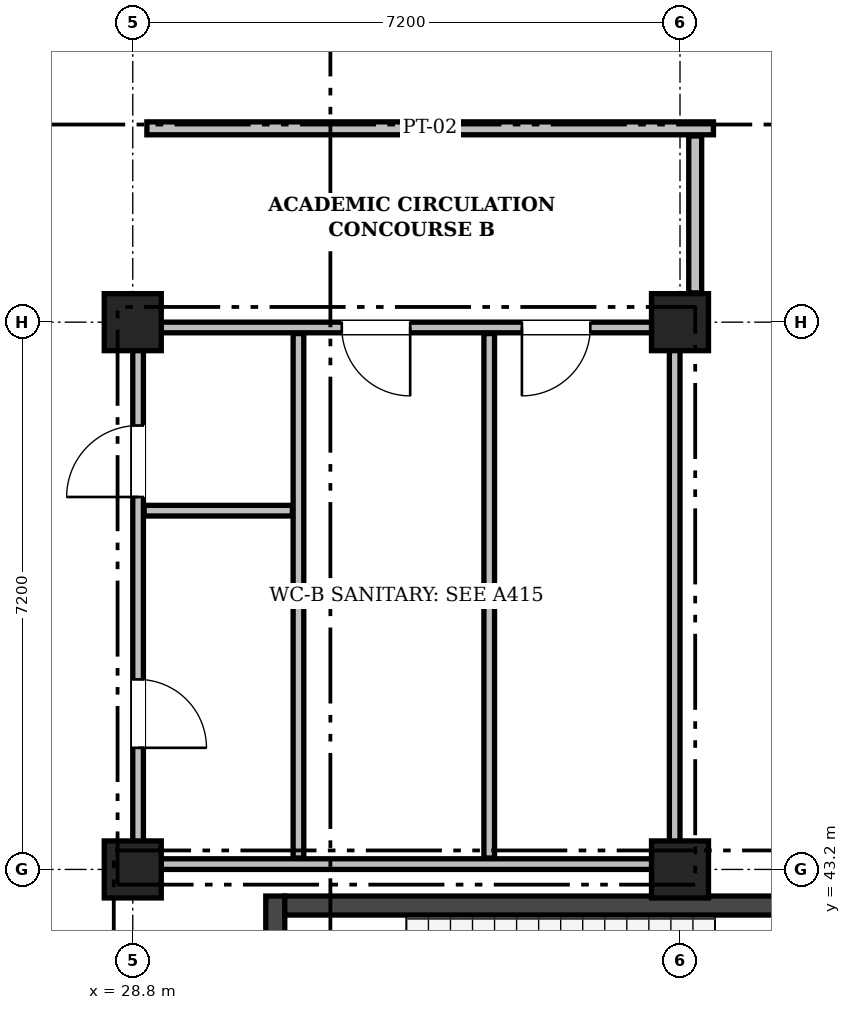
"""IFC4 building model, lengths in metres.
Left out: names, types, materials, properties, quantities, classifications, styles, units other than length and angle.
Written with IfcOpenShell. Run it as: python <this file> out.ifc"""

import sys

from ifc_helpers import new_model, si_unit, direction, frame, frame_2d, origin, origin_2d, place, context, subcontext, project, spatial, rectangle, extrude, element, fill, save


model = new_model("IFC4")
c1 = context("Model", 3, precision=1e-05, world=origin(), true_north=direction((0.0, 1.0)))
c2 = subcontext(c1, "Body", "Model", "MODEL_VIEW")
j1 = project(units=[si_unit("LENGTHUNIT", "METRE"), si_unit("PLANEANGLEUNIT", "RADIAN")], contexts=[c1])
p1 = place(None, origin())
s1 = spatial("IfcSite", under=j1, at=p1, CompositionType="ELEMENT")
p2 = place(p1, origin())
s2 = spatial("IfcBuilding", under=s1, at=p2, CompositionType="ELEMENT")
p3 = place(p2, frame((0.0, 0.0, 14.4)))
s3 = spatial("IfcBuildingStorey", under=s2, at=p3, CompositionType="ELEMENT", Elevation=14.4)
for number, where, z_axis, x_axis in (
    (1, (28.8, 43.2, 0.0), (0.0, 0.0, 1.0), (1.0, 0.0, 0.0)),
    (2, (28.8, 50.4, 0.0), (0.0, 0.0, 1.0), (1.0, 0.0, 0.0)),
    (3, (36.0, 43.2, 0.0), (0.0, 0.0, 1.0), (1.0, 0.0, 0.0)),
    (4, (36.0, 50.4, 0.0), (0.0, 0.0, 1.0), (1.0, 0.0, 0.0)),
):
    element("IfcColumn", number, at=place(p3, frame(where, z_axis=z_axis, x_axis=x_axis)), inside=s3, PredefinedType="COLUMN", context=c2, shape_type="SweptSolid", body=[
        extrude(rectangle(XDim=0.75, YDim=0.75, at=origin_2d()), origin(), (0.0, 0.0, 1.0), 4.5),
    ])
p4 = place(p3, frame((30.675, 39.15, 0.0), z_axis=(0.0, 0.0, 1.0), x_axis=(0.0, 1.0, 0.0)))
e5 = element("IfcWall", 5, at=p4, inside=s3, PredefinedType="SHEAR", context=c2, shape_type="SweptSolid", body=[
    extrude(rectangle(XDim=3.7, YDim=0.25, at=frame_2d((1.85, 0.0))), origin(), (0.0, 0.0, 1.0), 4.25),
])
p5 = place(p4, frame((1.25, 0.0, 0.0)))
e6 = element("IfcOpeningElement", 6, at=p5, cuts=e5, PredefinedType="OPENING", context=c2, shape_type="SweptSolid", body=[
    extrude(rectangle(XDim=1.2, YDim=2.15, at=frame_2d((0.6, 1.075))), frame((0.0, 0.137, 0.0), z_axis=(0.0, -1.0, 0.0), x_axis=(1.0, 0.0, 0.0)), (0.0, 0.0, 1.0), 0.274),
])
p6 = place(p3, frame((30.8, 42.725, 0.0), z_axis=(0.0, 0.0, 1.0), x_axis=(1.0, 0.0, 0.0)))
e7 = element("IfcWall", 7, at=p6, inside=s3, PredefinedType="SHEAR", context=c2, shape_type="SweptSolid", body=[
    extrude(rectangle(XDim=7.6, YDim=0.25, at=frame_2d((3.8, 0.0))), origin(), (0.0, 0.0, 1.0), 4.25),
])
p7 = place(p3, frame((28.87, 43.27, 0.0), z_axis=(0.0, 0.0, 1.0), x_axis=(1.0, 0.0, 0.0)))
e8 = element("IfcWall", 8, at=p7, inside=s3, PredefinedType="PARTITIONING", context=c2, shape_type="SweptSolid", body=[
    extrude(rectangle(XDim=7.06, YDim=0.14, at=frame_2d((3.53, 0.0))), origin(), (0.0, 0.0, 1.0), 3.7),
])
p8 = place(p3, frame((28.87, 50.33, 0.0), z_axis=(0.0, 0.0, 1.0), x_axis=(1.0, 0.0, 0.0)))
e9 = element("IfcWall", 9, at=p8, inside=s3, PredefinedType="PARTITIONING", context=c2, shape_type="SweptSolid", body=[
    extrude(rectangle(XDim=7.06, YDim=0.14, at=frame_2d((3.53, 0.0))), origin(), (0.0, 0.0, 1.0), 3.7),
])
p9 = place(p8, frame((2.68, 0.0, 0.0)))
e10 = element("IfcOpeningElement", 10, at=p9, cuts=e9, PredefinedType="OPENING", context=c2, shape_type="SweptSolid", body=[
    extrude(rectangle(XDim=0.9, YDim=2.08, at=frame_2d((0.45, 1.04))), frame((0.0, 0.082, 0.0), z_axis=(0.0, -1.0, 0.0), x_axis=(1.0, 0.0, 0.0)), (0.0, 0.0, 1.0), 0.164),
])
p10 = place(p8, frame((5.05, 0.0, 0.0)))
e11 = element("IfcOpeningElement", 11, at=p10, cuts=e9, PredefinedType="OPENING", context=c2, shape_type="SweptSolid", body=[
    extrude(rectangle(XDim=0.9, YDim=2.08, at=frame_2d((0.45, 1.04))), frame((0.0, 0.082, 0.0), z_axis=(0.0, -1.0, 0.0), x_axis=(1.0, 0.0, 0.0)), (0.0, 0.0, 1.0), 0.164),
])
p11 = place(p3, frame((28.87, 43.35, 0.0), z_axis=(0.0, 0.0, 1.0), x_axis=(0.0, 1.0, 0.0)))
e12 = element("IfcWall", 12, at=p11, inside=s3, PredefinedType="PARTITIONING", context=c2, shape_type="SweptSolid", body=[
    extrude(rectangle(XDim=6.9, YDim=0.14, at=frame_2d((3.45, 0.0))), origin(), (0.0, 0.0, 1.0), 3.73),
])
p12 = place(p11, frame((1.45, 0.0, 0.0)))
e13 = element("IfcOpeningElement", 13, at=p12, cuts=e12, PredefinedType="OPENING", context=c2, shape_type="SweptSolid", body=[
    extrude(rectangle(XDim=0.9, YDim=2.08, at=frame_2d((0.45, 1.04))), frame((0.0, 0.082, 0.0), z_axis=(0.0, -1.0, 0.0), x_axis=(1.0, 0.0, 0.0)), (0.0, 0.0, 1.0), 0.164),
])
p13 = place(p11, frame((4.75, 0.0, 0.0)))
e14 = element("IfcOpeningElement", 14, at=p13, cuts=e12, PredefinedType="OPENING", context=c2, shape_type="SweptSolid", body=[
    extrude(rectangle(XDim=0.94, YDim=2.1, at=frame_2d((0.47, 1.05))), frame((0.0, 0.082, 0.0), z_axis=(0.0, -1.0, 0.0), x_axis=(1.0, 0.0, 0.0)), (0.0, 0.0, 1.0), 0.164),
])
p14 = place(p3, frame((35.93, 43.35, 0.0), z_axis=(0.0, 0.0, 1.0), x_axis=(0.0, 1.0, 0.0)))
e15 = element("IfcWall", 15, at=p14, inside=s3, PredefinedType="PARTITIONING", context=c2, shape_type="SweptSolid", body=[
    extrude(rectangle(XDim=6.9, YDim=0.14, at=frame_2d((3.45, 0.0))), origin(), (0.0, 0.0, 1.0), 3.73),
])
for number, where, z_axis, x_axis in (
    (16, (30.98, 43.35, 0.0), (0.0, 0.0, 1.0), (0.0, 1.0, 0.0)),
    (17, (33.49, 43.35, 0.0), (0.0, 0.0, 1.0), (0.0, 1.0, 0.0)),
):
    element("IfcWall", number, at=place(p3, frame(where, z_axis=z_axis, x_axis=x_axis)), inside=s3, PredefinedType="PARTITIONING", context=c2, shape_type="SweptSolid", body=[
        extrude(rectangle(XDim=6.9, YDim=0.14, at=frame_2d((3.45, 0.0))), origin(), (0.0, 0.0, 1.0), 4.16),
    ])
p15 = place(p3, frame((28.95, 47.92, 0.0), z_axis=(0.0, 0.0, 1.0), x_axis=(1.0, 0.0, 0.0)))
e18 = element("IfcWall", 18, at=p15, inside=s3, PredefinedType="PARTITIONING", context=c2, shape_type="SweptSolid", body=[
    extrude(rectangle(XDim=1.95, YDim=0.14, at=frame_2d((0.975, 0.0))), origin(), (0.0, 0.0, 1.0), 4.16),
])
p16 = place(p3, frame((28.986, 52.95, 0.0), z_axis=(0.0, 0.0, 1.0), x_axis=(1.0, 0.0, 0.0)))
e19 = element("IfcWall", 19, at=p16, inside=s3, PredefinedType="PARTITIONING", context=c2, shape_type="SweptSolid", body=[
    extrude(rectangle(XDim=7.454, YDim=0.17, at=frame_2d((3.727, 0.0))), origin(), (0.0, 0.0, 1.0), 4.16),
])
p17 = place(p3, frame((36.2, 50.785, 0.0), z_axis=(0.0, 0.0, 1.0), x_axis=(0.0, 1.0, 0.0)))
e20 = element("IfcWall", 20, at=p17, inside=s3, PredefinedType="PARTITIONING", context=c2, shape_type="SweptSolid", body=[
    extrude(rectangle(XDim=2.065, YDim=0.17, at=frame_2d((1.033, 0.0))), origin(), (0.0, 0.0, 1.0), 3.73),
])
p18 = place(p12, frame((0.9, 0.0, 0.0), z_axis=(0.0, 0.0, 1.0), x_axis=(-1.0, 0.0, 0.0)))
e21 = element("IfcDoor", 21, at=p18, inside=s3, OperationType="SINGLE_SWING_RIGHT", PredefinedType="DOOR", context=c2, shape_type="SweptSolid", body=[
    extrude(rectangle(XDim=0.9, YDim=2.08, at=frame_2d((0.45, 1.04))), frame((0.0, 0.025, 0.0), z_axis=(0.0, -1.0, 0.0), x_axis=(1.0, 0.0, 0.0)), (0.0, 0.0, 1.0), 0.05),
])
fill(e13, e21)
p19 = place(p13, origin())
e22 = element("IfcDoor", 22, at=p19, inside=s3, OperationType="SINGLE_SWING_LEFT", PredefinedType="DOOR", context=c2, shape_type="SweptSolid", body=[
    extrude(rectangle(XDim=0.94, YDim=2.1, at=frame_2d((0.47, 1.05))), frame((0.0, 0.025, 0.0), z_axis=(0.0, -1.0, 0.0), x_axis=(1.0, 0.0, 0.0)), (0.0, 0.0, 1.0), 0.05),
])
fill(e14, e22)
p20 = place(p9, frame((0.9, 0.0, 0.0), z_axis=(0.0, 0.0, 1.0), x_axis=(-1.0, 0.0, 0.0)))
e23 = element("IfcDoor", 23, at=p20, inside=s3, OperationType="SINGLE_SWING_LEFT", PredefinedType="DOOR", context=c2, shape_type="SweptSolid", body=[
    extrude(rectangle(XDim=0.9, YDim=2.08, at=frame_2d((0.45, 1.04))), frame((0.0, 0.025, 0.0), z_axis=(0.0, -1.0, 0.0), x_axis=(1.0, 0.0, 0.0)), (0.0, 0.0, 1.0), 0.05),
])
fill(e10, e23)
p21 = place(p10, frame((0.9, 0.0, 0.0), z_axis=(0.0, 0.0, 1.0), x_axis=(-1.0, 0.0, 0.0)))
e24 = element("IfcDoor", 24, at=p21, inside=s3, OperationType="SINGLE_SWING_RIGHT", PredefinedType="DOOR", context=c2, shape_type="SweptSolid", body=[
    extrude(rectangle(XDim=0.9, YDim=2.08, at=frame_2d((0.45, 1.04))), frame((0.0, 0.025, 0.0), z_axis=(0.0, -1.0, 0.0), x_axis=(1.0, 0.0, 0.0)), (0.0, 0.0, 1.0), 0.05),
])
fill(e11, e24)
save(model, sys.argv[1])
